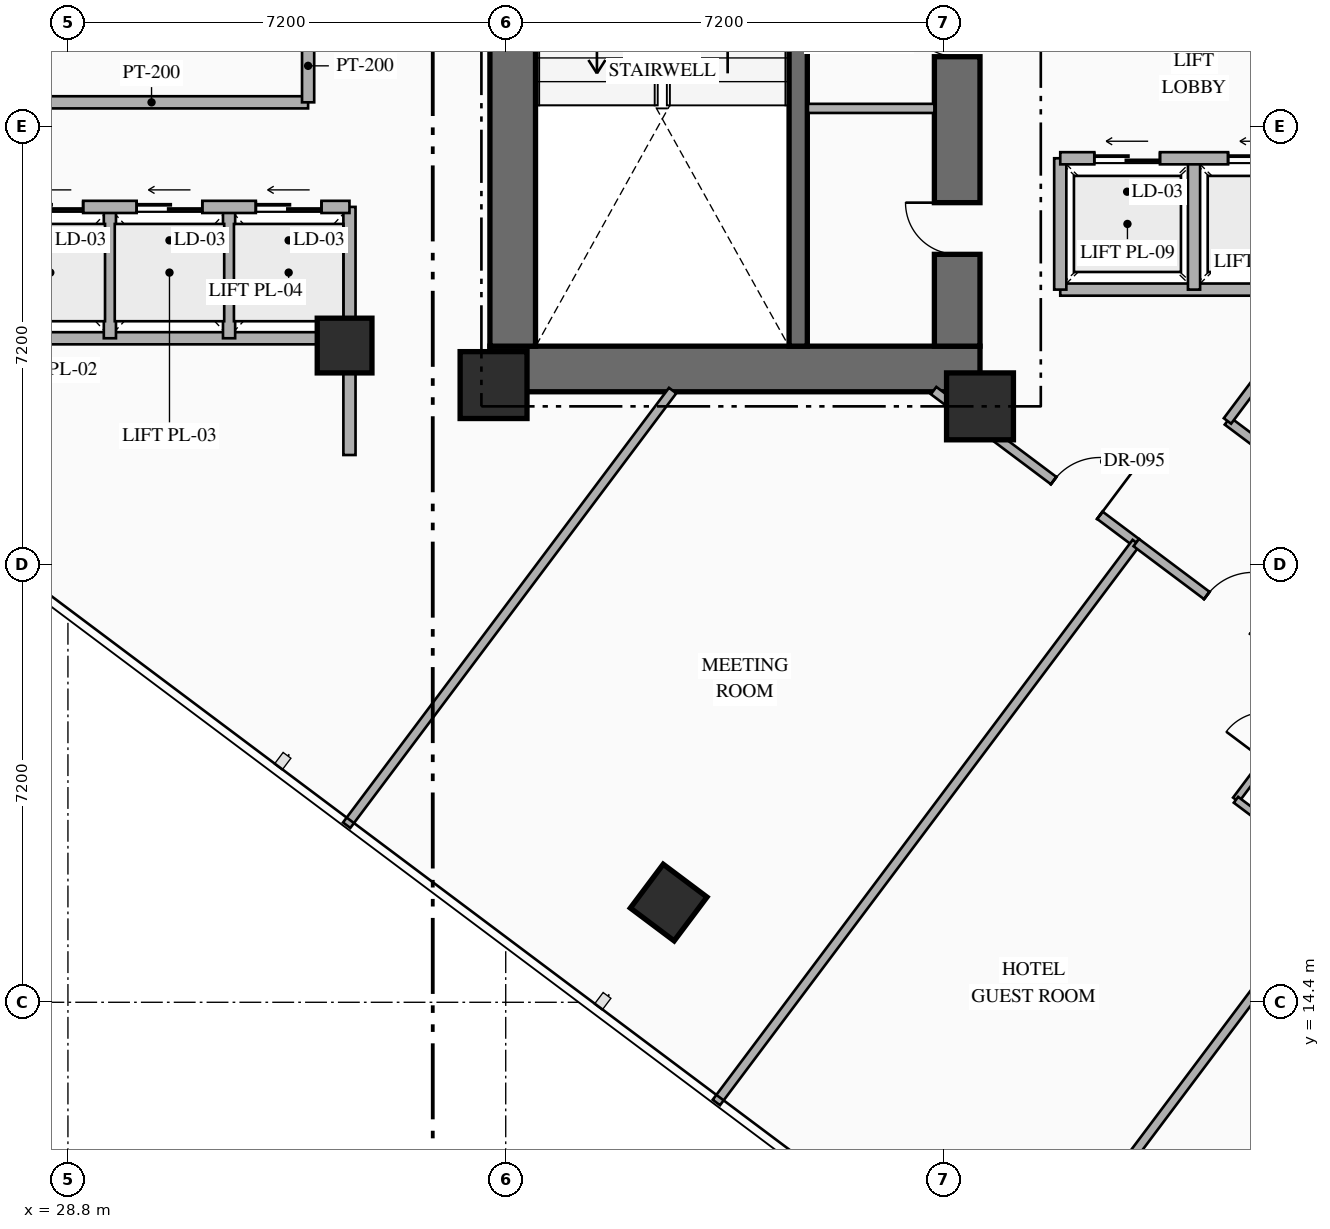
"""IFC4 building model, lengths in metres.
Left out: names, types, materials, properties, quantities, classifications, styles, units other than length and angle.
Written with IfcOpenShell. Run it as: python <this file> out.ifc"""

import sys

from ifc_helpers import new_model, si_unit, direction, frame, frame_2d, origin, origin_2d, place, context, subcontext, project, spatial, rectangle, hollow_rectangle, extrude, element, fill, save


model = new_model("IFC4")
c1 = context("Model", 3, precision=1e-05, world=origin(), true_north=direction((0.0, 1.0)))
c2 = subcontext(c1, "Body", "Model", "MODEL_VIEW")
j1 = project(units=[si_unit("LENGTHUNIT", "METRE"), si_unit("PLANEANGLEUNIT", "RADIAN")], contexts=[c1])
p1 = place(None, origin())
s1 = spatial("IfcSite", under=j1, at=p1, CompositionType="ELEMENT")
p2 = place(p1, origin())
s2 = spatial("IfcBuilding", under=s1, at=p2, CompositionType="ELEMENT")
p3 = place(p2, frame((0.0, 0.0, 84.65)))
s3 = spatial("IfcBuildingStorey", under=s2, at=p3, CompositionType="ELEMENT", Elevation=84.65)
p4 = place(p3, frame((35.74, 24.815, 0.0), z_axis=(0.0, 0.0, 1.0), x_axis=(1.0, 0.0, 0.0)))
e1 = element("IfcWall", 1, at=p4, inside=s3, PredefinedType="SHEAR", context=c2, shape_type="SweptSolid", body=[
    extrude(rectangle(XDim=8.06, YDim=0.75, at=frame_2d((4.03, 0.0))), origin(), (0.0, 0.0, 1.0), 3.35),
])
p5 = place(p3, frame((36.115, 25.19, 0.0), z_axis=(0.0, 0.0, 1.0), x_axis=(0.0, 1.0, 0.0)))
e2 = element("IfcWall", 2, at=p5, inside=s3, PredefinedType="SHEAR", context=c2, shape_type="SweptSolid", body=[
    extrude(rectangle(XDim=9.48, YDim=0.75, at=frame_2d((4.74, 0.0))), origin(), (0.0, 0.0, 1.0), 3.35),
])
p6 = place(p3, frame((43.425, 25.19, 0.0), z_axis=(0.0, 0.0, 1.0), x_axis=(0.0, 1.0, 0.0)))
e3 = element("IfcWall", 3, at=p6, inside=s3, PredefinedType="SHEAR", context=c2, shape_type="SweptSolid", body=[
    extrude(rectangle(XDim=9.48, YDim=0.75, at=frame_2d((4.74, 0.0))), origin(), (0.0, 0.0, 1.0), 3.35),
])
p7 = place(p6, frame((1.51, 0.0, 0.0)))
e4 = element("IfcOpeningElement", 4, at=p7, cuts=e3, PredefinedType="OPENING", context=c2, shape_type="SweptSolid", body=[
    extrude(rectangle(XDim=0.85, YDim=2.08, at=frame_2d((0.425, 1.04))), frame((0.0, 0.385, 0.0), z_axis=(0.0, -1.0, 0.0), x_axis=(1.0, 0.0, 0.0)), (0.0, 0.0, 1.0), 0.77),
])
p8 = place(p6, frame((4.76, 0.0, 0.0)))
e5 = element("IfcOpeningElement", 5, at=p8, cuts=e3, PredefinedType="OPENING", context=c2, shape_type="SweptSolid", body=[
    extrude(rectangle(XDim=0.85, YDim=2.08, at=frame_2d((0.425, 1.04))), frame((0.0, 0.385, 0.0), z_axis=(0.0, -1.0, 0.0), x_axis=(1.0, 0.0, 0.0)), (0.0, 0.0, 1.0), 0.77),
])
p9 = place(p3, frame((40.81, 25.19, 0.0), z_axis=(0.0, 0.0, 1.0), x_axis=(0.0, 1.0, 0.0)))
e6 = element("IfcWall", 6, at=p9, inside=s3, PredefinedType="SHEAR", context=c2, shape_type="SweptSolid", body=[
    extrude(rectangle(XDim=9.48, YDim=0.3, at=frame_2d((4.74, 0.0))), origin(), (0.0, 0.0, 1.0), 3.35),
])
for number, where, z_axis, x_axis in (
    (7, (35.8, 24.55, 0.0), (0.0, 0.0, 1.0), (1.0, 0.0, 0.0)),
    (8, (43.8, 24.2, 0.0), (0.0, 0.0, 1.0), (1.0, 0.0, 0.0)),
):
    element("IfcColumn", number, at=place(p3, frame(where, z_axis=z_axis, x_axis=x_axis)), inside=s3, PredefinedType="COLUMN", context=c2, shape_type="SweptSolid", body=[
        extrude(rectangle(XDim=1.1, YDim=1.1, at=origin_2d()), origin(), (0.0, 0.0, 1.0), 3.35),
    ])
for number, where, z_axis, x_axis in (
    (9, (33.35, 25.2, 0.0), (0.0, 0.0, 1.0), (1.0, 0.0, 0.0)),
    (10, (38.68, 16.04, 0.0), (0.0, 0.0, 1.0), (0.8, -0.6, 0.0)),
):
    element("IfcColumn", number, at=place(p3, frame(where, z_axis=z_axis, x_axis=x_axis)), inside=s3, PredefinedType="COLUMN", context=c2, shape_type="SweptSolid", body=[
        extrude(hollow_rectangle(XDim=0.9, YDim=0.9, WallThickness=0.036, at=origin_2d()), origin(), (0.0, 0.0, 1.0), 3.35),
    ])
p10 = place(p3, frame((44.86, 40.73, 0.0), z_axis=(0.0, 0.0, 1.0), x_axis=(0.800006902154, -0.599990797017, 0.0)))
e11 = element("IfcWall", 11, at=p10, inside=s3, PredefinedType="STANDARD", context=c2, shape_type="SweptSolid", body=[
    extrude(rectangle(XDim=29.712, YDim=0.28, at=frame_2d((14.856, 0.0))), origin(), (0.0, 0.0, 1.0), 3.13),
])
p11 = place(p10, frame((14.249, 0.0, 0.0)))
e12 = element("IfcOpeningElement", 12, at=p11, cuts=e11, PredefinedType="OPENING", context=c2, shape_type="SweptSolid", body=[
    extrude(rectangle(XDim=1.1, YDim=2.2, at=frame_2d((0.55, 1.1))), frame((0.0, 0.15, 0.0), z_axis=(0.0, -1.0, 0.0), x_axis=(1.0, 0.0, 0.0)), (0.0, 0.0, 1.0), 0.3),
])
p12 = place(p10, frame((1.612, 0.0, 0.85)))
e13 = element("IfcOpeningElement", 13, at=p12, cuts=e11, PredefinedType="OPENING", context=c2, shape_type="SweptSolid", body=[
    extrude(rectangle(XDim=1.4, YDim=1.8, at=frame_2d((0.7, 0.9))), frame((0.0, 0.15, 0.0), z_axis=(0.0, -1.0, 0.0), x_axis=(1.0, 0.0, 0.0)), (0.0, 0.0, 1.0), 0.3),
])
p13 = place(p10, frame((5.667, 0.0, 0.85)))
e14 = element("IfcOpeningElement", 14, at=p13, cuts=e11, PredefinedType="OPENING", context=c2, shape_type="SweptSolid", body=[
    extrude(rectangle(XDim=1.4, YDim=1.8, at=frame_2d((0.7, 0.9))), frame((0.0, 0.15, 0.0), z_axis=(0.0, -1.0, 0.0), x_axis=(1.0, 0.0, 0.0)), (0.0, 0.0, 1.0), 0.3),
])
p14 = place(p10, frame((9.912, 0.0, 0.85)))
e15 = element("IfcOpeningElement", 15, at=p14, cuts=e11, PredefinedType="OPENING", context=c2, shape_type="SweptSolid", body=[
    extrude(rectangle(XDim=1.4, YDim=1.8, at=frame_2d((0.7, 0.9))), frame((0.0, 0.15, 0.0), z_axis=(0.0, -1.0, 0.0), x_axis=(1.0, 0.0, 0.0)), (0.0, 0.0, 1.0), 0.3),
])
p15 = place(p10, frame((19.743, 0.0, 0.85)))
e16 = element("IfcOpeningElement", 16, at=p15, cuts=e11, PredefinedType="OPENING", context=c2, shape_type="SweptSolid", body=[
    extrude(rectangle(XDim=1.4, YDim=1.8, at=frame_2d((0.7, 0.9))), frame((0.0, 0.15, 0.0), z_axis=(0.0, -1.0, 0.0), x_axis=(1.0, 0.0, 0.0)), (0.0, 0.0, 1.0), 0.3),
])
p16 = place(p10, frame((22.645, 0.0, 0.85)))
e17 = element("IfcOpeningElement", 17, at=p16, cuts=e11, PredefinedType="OPENING", context=c2, shape_type="SweptSolid", body=[
    extrude(rectangle(XDim=1.4, YDim=1.8, at=frame_2d((0.7, 0.9))), frame((0.0, 0.15, 0.0), z_axis=(0.0, -1.0, 0.0), x_axis=(1.0, 0.0, 0.0)), (0.0, 0.0, 1.0), 0.3),
])
p17 = place(p10, frame((26.7, 0.0, 0.85)))
e18 = element("IfcOpeningElement", 18, at=p17, cuts=e11, PredefinedType="OPENING", context=c2, shape_type="SweptSolid", body=[
    extrude(rectangle(XDim=1.4, YDim=1.8, at=frame_2d((0.7, 0.9))), frame((0.0, 0.15, 0.0), z_axis=(0.0, -1.0, 0.0), x_axis=(1.0, 0.0, 0.0)), (0.0, 0.0, 1.0), 0.3),
])
p18 = place(p3, frame((40.97, 29.1, 0.0), z_axis=(0.0, 0.0, 1.0), x_axis=(1.0, 0.0, 0.0)))
e19 = element("IfcWall", 19, at=p18, inside=s3, PredefinedType="PARTITIONING", context=c2, shape_type="SweptSolid", body=[
    extrude(rectangle(XDim=2.08, YDim=0.15, at=frame_2d((1.04, 0.0))), origin(), (0.0, 0.0, 1.0), 3.13),
])
p19 = place(p3, frame((27.6, 29.2, 0.0), z_axis=(0.0, 0.0, 1.0), x_axis=(1.0, 0.0, 0.0)))
e20 = element("IfcWall", 20, at=p19, inside=s3, PredefinedType="STANDARD", context=c2, shape_type="SweptSolid", body=[
    extrude(rectangle(XDim=5.15, YDim=0.2, at=frame_2d((2.575, 0.0))), origin(), (0.0, 0.0, 1.0), 3.13),
])
p20 = place(p3, frame((32.75, 29.2, 0.0), z_axis=(0.0, 0.0, 1.0), x_axis=(0.0, 1.0, 0.0)))
e21 = element("IfcWall", 21, at=p20, inside=s3, PredefinedType="STANDARD", context=c2, shape_type="SweptSolid", body=[
    extrude(rectangle(XDim=3.24, YDim=0.2, at=frame_2d((1.62, 0.0))), origin(), (0.0, 0.0, 1.0), 3.13),
])
p21 = place(p20, frame((1.45, 0.0, 0.0)))
e22 = element("IfcOpeningElement", 22, at=p21, cuts=e21, PredefinedType="OPENING", context=c2, shape_type="SweptSolid", body=[
    extrude(rectangle(XDim=1.0, YDim=2.2, at=frame_2d((0.5, 1.1))), frame((0.0, 0.11, 0.0), z_axis=(0.0, -1.0, 0.0), x_axis=(1.0, 0.0, 0.0)), (0.0, 0.0, 1.0), 0.22),
])
p22 = place(p3, frame((33.43, 23.4, 0.0), z_axis=(0.0, 0.0, 1.0), x_axis=(0.0, 1.0, 0.0)))
e23 = element("IfcWall", 23, at=p22, inside=s3, PredefinedType="STANDARD", context=c2, shape_type="SweptSolid", body=[
    extrude(rectangle(XDim=4.08, YDim=0.2, at=frame_2d((2.04, 0.0))), origin(), (0.0, 0.0, 1.0), 2.425),
])
p23 = place(p3, frame((25.55, 25.32, 0.0), z_axis=(0.0, 0.0, 1.0), x_axis=(1.0, 0.0, 0.0)))
e24 = element("IfcWall", 24, at=p23, inside=s3, PredefinedType="STANDARD", context=c2, shape_type="SweptSolid", body=[
    extrude(rectangle(XDim=7.88, YDim=0.2, at=frame_2d((3.94, 0.0))), origin(), (0.0, 0.0, 1.0), 2.525),
])
for number, where, z_axis, x_axis in (
    (25, (29.49, 25.32, 0.0), (0.0, 0.0, 1.0), (0.0, 1.0, 0.0)),
    (26, (31.45, 25.32, 0.0), (0.0, 0.0, 1.0), (0.0, 1.0, 0.0)),
):
    element("IfcWall", number, at=place(p3, frame(where, z_axis=z_axis, x_axis=x_axis)), inside=s3, PredefinedType="STANDARD", context=c2, shape_type="SweptSolid", body=[
        extrude(rectangle(XDim=2.16, YDim=0.2, at=frame_2d((1.08, 0.0))), origin(), (0.0, 0.0, 1.0), 3.13),
    ])
p24 = place(p3, frame((25.55, 27.48, 0.0), z_axis=(0.0, 0.0, 1.0), x_axis=(1.0, 0.0, 0.0)))
e27 = element("IfcWall", 27, at=p24, inside=s3, PredefinedType="STANDARD", context=c2, shape_type="SweptSolid", body=[
    extrude(rectangle(XDim=7.88, YDim=0.2, at=frame_2d((3.94, 0.0))), origin(), (0.0, 0.0, 1.0), 3.13),
])
p25 = place(p24, frame((0.46, 0.0, 0.0)))
e28 = element("IfcOpeningElement", 28, at=p25, cuts=e27, PredefinedType="OPENING", context=c2, shape_type="SweptSolid", body=[
    extrude(rectangle(XDim=1.08, YDim=2.15, at=frame_2d((0.54, 1.075))), frame((0.0, 0.11, 0.0), z_axis=(0.0, -1.0, 0.0), x_axis=(1.0, 0.0, 0.0)), (0.0, 0.0, 1.0), 0.22),
])
p26 = place(p24, frame((2.42, 0.0, 0.0)))
e29 = element("IfcOpeningElement", 29, at=p26, cuts=e27, PredefinedType="OPENING", context=c2, shape_type="SweptSolid", body=[
    extrude(rectangle(XDim=1.08, YDim=2.15, at=frame_2d((0.54, 1.075))), frame((0.0, 0.11, 0.0), z_axis=(0.0, -1.0, 0.0), x_axis=(1.0, 0.0, 0.0)), (0.0, 0.0, 1.0), 0.22),
])
p27 = place(p24, frame((4.38, 0.0, 0.0)))
e30 = element("IfcOpeningElement", 30, at=p27, cuts=e27, PredefinedType="OPENING", context=c2, shape_type="SweptSolid", body=[
    extrude(rectangle(XDim=1.08, YDim=2.15, at=frame_2d((0.54, 1.075))), frame((0.0, 0.11, 0.0), z_axis=(0.0, -1.0, 0.0), x_axis=(1.0, 0.0, 0.0)), (0.0, 0.0, 1.0), 0.22),
])
p28 = place(p24, frame((6.34, 0.0, 0.0)))
e31 = element("IfcOpeningElement", 31, at=p28, cuts=e27, PredefinedType="OPENING", context=c2, shape_type="SweptSolid", body=[
    extrude(rectangle(XDim=1.08, YDim=2.15, at=frame_2d((0.54, 1.075))), frame((0.0, 0.11, 0.0), z_axis=(0.0, -1.0, 0.0), x_axis=(1.0, 0.0, 0.0)), (0.0, 0.0, 1.0), 0.22),
])
p29 = place(p3, frame((45.12, 26.12, 0.0), z_axis=(0.0, 0.0, 1.0), x_axis=(1.0, 0.0, 0.0)))
e32 = element("IfcWall", 32, at=p29, inside=s3, PredefinedType="STANDARD", context=c2, shape_type="SweptSolid", body=[
    extrude(rectangle(XDim=4.4, YDim=0.2, at=frame_2d((2.2, 0.0))), origin(), (0.0, 0.0, 1.0), 3.13),
])
for number, where, z_axis, x_axis in (
    (33, (45.12, 26.12, 0.0), (0.0, 0.0, 1.0), (0.0, 1.0, 0.0)),
    (34, (47.32, 26.12, 0.0), (0.0, 0.0, 1.0), (0.0, 1.0, 0.0)),
):
    element("IfcWall", number, at=place(p3, frame(where, z_axis=z_axis, x_axis=x_axis)), inside=s3, PredefinedType="STANDARD", context=c2, shape_type="SweptSolid", body=[
        extrude(rectangle(XDim=2.16, YDim=0.2, at=frame_2d((1.08, 0.0))), origin(), (0.0, 0.0, 1.0), 3.13),
    ])
p30 = place(p3, frame((45.12, 28.28, 0.0), z_axis=(0.0, 0.0, 1.0), x_axis=(1.0, 0.0, 0.0)))
e35 = element("IfcWall", 35, at=p30, inside=s3, PredefinedType="STANDARD", context=c2, shape_type="SweptSolid", body=[
    extrude(rectangle(XDim=4.4, YDim=0.2, at=frame_2d((2.2, 0.0))), origin(), (0.0, 0.0, 1.0), 3.13),
])
p31 = place(p30, frame((0.56, 0.0, 0.0)))
e36 = element("IfcOpeningElement", 36, at=p31, cuts=e35, PredefinedType="OPENING", context=c2, shape_type="SweptSolid", body=[
    extrude(rectangle(XDim=1.08, YDim=2.15, at=frame_2d((0.54, 1.075))), frame((0.0, 0.11, 0.0), z_axis=(0.0, -1.0, 0.0), x_axis=(1.0, 0.0, 0.0)), (0.0, 0.0, 1.0), 0.22),
])
p32 = place(p30, frame((2.76, 0.0, 0.0)))
e37 = element("IfcOpeningElement", 37, at=p32, cuts=e35, PredefinedType="OPENING", context=c2, shape_type="SweptSolid", body=[
    extrude(rectangle(XDim=1.08, YDim=2.15, at=frame_2d((0.54, 1.075))), frame((0.0, 0.11, 0.0), z_axis=(0.0, -1.0, 0.0), x_axis=(1.0, 0.0, 0.0)), (0.0, 0.0, 1.0), 0.22),
])
p33 = place(p3, frame((43.037, 24.46, 0.0), z_axis=(0.0, 0.0, 1.0), x_axis=(0.799971872363, -0.600037501685, 0.0)))
e38 = element("IfcWall", 38, at=p33, inside=s3, PredefinedType="PARTITIONING", context=c2, shape_type="SweptSolid", body=[
    extrude(rectangle(XDim=4.167, YDim=0.15, at=frame_2d((2.083, 0.0))), origin(), (0.0, 0.0, 1.0), 2.425),
])
p34 = place(p33, frame((2.468, 0.0, 0.0)))
e39 = element("IfcOpeningElement", 39, at=p34, cuts=e38, PredefinedType="OPENING", context=c2, shape_type="SweptSolid", body=[
    extrude(rectangle(XDim=0.95, YDim=2.15, at=frame_2d((0.475, 1.075))), frame((0.0, 0.085, 0.0), z_axis=(0.0, -1.0, 0.0), x_axis=(1.0, 0.0, 0.0)), (0.0, 0.0, 1.0), 0.17),
])
p35 = place(p3, frame((33.384, 17.312, 0.0), z_axis=(0.0, 0.0, 1.0), x_axis=(0.600008743659, 0.799993442181, 0.0)))
e40 = element("IfcWall", 40, at=p35, inside=s3, PredefinedType="PARTITIONING", context=c2, shape_type="SweptSolid", body=[
    extrude(rectangle(XDim=8.935, YDim=0.15, at=frame_2d((4.468, 0.0))), origin(), (0.0, 0.0, 1.0), 3.13),
])
p36 = place(p3, frame((39.464, 12.752, 0.0), z_axis=(0.0, 0.0, 1.0), x_axis=(0.6, 0.8, 0.0)))
e41 = element("IfcWall", 41, at=p36, inside=s3, PredefinedType="PARTITIONING", context=c2, shape_type="SweptSolid", body=[
    extrude(rectangle(XDim=11.51, YDim=0.15, at=frame_2d((5.755, 0.0))), origin(), (0.0, 0.0, 1.0), 3.13),
])
p37 = place(p3, frame((47.87, 23.96, 0.0), z_axis=(0.0, 0.0, 1.0), x_axis=(0.79998637334, -0.60001816845, 0.0)))
e42 = element("IfcWall", 42, at=p37, inside=s3, PredefinedType="PARTITIONING", context=c2, shape_type="SweptSolid", body=[
    extrude(rectangle(XDim=2.15, YDim=0.15, at=frame_2d((1.075, 0.0))), origin(), (0.0, 0.0, 1.0), 2.775),
])
p38 = place(p3, frame((47.87, 23.96, 0.0), z_axis=(0.0, 0.0, 1.0), x_axis=(0.599996617946, 0.80000253653, 0.0)))
e43 = element("IfcWall", 43, at=p38, inside=s3, PredefinedType="PARTITIONING", context=c2, shape_type="SweptSolid", body=[
    extrude(rectangle(XDim=11.55, YDim=0.15, at=frame_2d((5.775, 0.0))), origin(), (0.0, 0.0, 1.0), 3.13),
])
p39 = place(p3, frame((46.37, 21.96, 0.0), z_axis=(0.0, 0.0, 1.0), x_axis=(0.799977170108, -0.600030438649, 0.0)))
e44 = element("IfcWall", 44, at=p39, inside=s3, PredefinedType="PARTITIONING", context=c2, shape_type="SweptSolid", body=[
    extrude(rectangle(XDim=3.85, YDim=0.15, at=frame_2d((1.925, 0.0))), origin(), (0.0, 0.0, 1.0), 2.425),
])
p40 = place(p39, frame((1.45, 0.0, 0.0)))
e45 = element("IfcOpeningElement", 45, at=p40, cuts=e44, PredefinedType="OPENING", context=c2, shape_type="SweptSolid", body=[
    extrude(rectangle(XDim=0.95, YDim=2.15, at=frame_2d((0.475, 1.075))), frame((0.0, 0.085, 0.0), z_axis=(0.0, -1.0, 0.0), x_axis=(1.0, 0.0, 0.0)), (0.0, 0.0, 1.0), 0.17),
])
p41 = place(p3, frame((48.01, 17.73, 0.0), z_axis=(0.0, 0.0, 1.0), x_axis=(0.6, 0.8, 0.0)))
e46 = element("IfcWall", 46, at=p41, inside=s3, PredefinedType="PARTITIONING", context=c2, shape_type="SweptSolid", body=[
    extrude(rectangle(XDim=2.4, YDim=0.12, at=frame_2d((1.2, 0.0))), origin(), (0.0, 0.0, 1.0), 3.13),
])
p42 = place(p41, frame((0.8, 0.0, 0.0)))
e47 = element("IfcOpeningElement", 47, at=p42, cuts=e46, PredefinedType="OPENING", context=c2, shape_type="SweptSolid", body=[
    extrude(rectangle(XDim=0.8, YDim=2.06, at=frame_2d((0.4, 1.03))), frame((0.0, 0.07, 0.0), z_axis=(0.0, -1.0, 0.0), x_axis=(1.0, 0.0, 0.0)), (0.0, 0.0, 1.0), 0.14),
])
p43 = place(p3, frame((48.01, 17.73, 0.0), z_axis=(0.0, 0.0, 1.0), x_axis=(0.79998637334, -0.60001816845, 0.0)))
e48 = element("IfcWall", 48, at=p43, inside=s3, PredefinedType="PARTITIONING", context=c2, shape_type="SweptSolid", body=[
    extrude(rectangle(XDim=2.15, YDim=0.12, at=frame_2d((1.075, 0.0))), origin(), (0.0, 0.0, 1.0), 3.13),
])
p44 = place(p3, frame((44.36, 9.28, 0.0), z_axis=(0.0, 0.0, 1.0), x_axis=(0.599986233332, 0.800010324816, 0.0)))
e49 = element("IfcWall", 49, at=p44, inside=s3, PredefinedType="PARTITIONING", context=c2, shape_type="SweptSolid", body=[
    extrude(rectangle(XDim=11.35, YDim=0.15, at=frame_2d((5.675, 0.0))), origin(), (0.0, 0.0, 1.0), 2.425),
])
p45 = place(p7, origin())
e50 = element("IfcDoor", 50, at=p45, inside=s3, OperationType="SINGLE_SWING_RIGHT", PredefinedType="DOOR", context=c2, shape_type="SweptSolid", body=[
    extrude(rectangle(XDim=0.85, YDim=2.08, at=frame_2d((0.425, 1.04))), frame((0.0, 0.025, 0.0), z_axis=(0.0, -1.0, 0.0), x_axis=(1.0, 0.0, 0.0)), (0.0, 0.0, 1.0), 0.05),
])
fill(e4, e50)
p46 = place(p8, origin())
e51 = element("IfcDoor", 51, at=p46, inside=s3, OperationType="SINGLE_SWING_RIGHT", PredefinedType="DOOR", context=c2, shape_type="SweptSolid", body=[
    extrude(rectangle(XDim=0.85, YDim=2.08, at=frame_2d((0.425, 1.04))), frame((0.0, 0.025, 0.0), z_axis=(0.0, -1.0, 0.0), x_axis=(1.0, 0.0, 0.0)), (0.0, 0.0, 1.0), 0.05),
])
fill(e5, e51)
p47 = place(p26, origin())
e52 = element("IfcDoor", 52, at=p47, inside=s3, OperationType="SLIDING_TO_LEFT", PredefinedType="USERDEFINED", context=c2, shape_type="SweptSolid", body=[
    extrude(rectangle(XDim=1.08, YDim=2.15, at=frame_2d((0.54, 1.075))), frame((0.0, 0.025, 0.0), z_axis=(0.0, -1.0, 0.0), x_axis=(1.0, 0.0, 0.0)), (0.0, 0.0, 1.0), 0.05),
])
fill(e29, e52)
p48 = place(p27, origin())
e53 = element("IfcDoor", 53, at=p48, inside=s3, OperationType="SLIDING_TO_LEFT", PredefinedType="USERDEFINED", context=c2, shape_type="SweptSolid", body=[
    extrude(rectangle(XDim=1.08, YDim=2.15, at=frame_2d((0.54, 1.075))), frame((0.0, 0.025, 0.0), z_axis=(0.0, -1.0, 0.0), x_axis=(1.0, 0.0, 0.0)), (0.0, 0.0, 1.0), 0.05),
])
fill(e30, e53)
p49 = place(p28, origin())
e54 = element("IfcDoor", 54, at=p49, inside=s3, OperationType="SLIDING_TO_LEFT", PredefinedType="USERDEFINED", context=c2, shape_type="SweptSolid", body=[
    extrude(rectangle(XDim=1.08, YDim=2.15, at=frame_2d((0.54, 1.075))), frame((0.0, 0.025, 0.0), z_axis=(0.0, -1.0, 0.0), x_axis=(1.0, 0.0, 0.0)), (0.0, 0.0, 1.0), 0.05),
])
fill(e31, e54)
p50 = place(p31, origin())
e55 = element("IfcDoor", 55, at=p50, inside=s3, OperationType="SLIDING_TO_LEFT", PredefinedType="USERDEFINED", context=c2, shape_type="SweptSolid", body=[
    extrude(rectangle(XDim=1.08, YDim=2.15, at=frame_2d((0.54, 1.075))), frame((0.0, 0.025, 0.0), z_axis=(0.0, -1.0, 0.0), x_axis=(1.0, 0.0, 0.0)), (0.0, 0.0, 1.0), 0.05),
])
fill(e36, e55)
p51 = place(p32, origin())
e56 = element("IfcDoor", 56, at=p51, inside=s3, OperationType="SLIDING_TO_LEFT", PredefinedType="USERDEFINED", context=c2, shape_type="SweptSolid", body=[
    extrude(rectangle(XDim=1.08, YDim=2.15, at=frame_2d((0.54, 1.075))), frame((0.0, 0.025, 0.0), z_axis=(0.0, -1.0, 0.0), x_axis=(1.0, 0.0, 0.0)), (0.0, 0.0, 1.0), 0.05),
])
fill(e37, e56)
p52 = place(p34, origin())
e57 = element("IfcDoor", 57, at=p52, inside=s3, OperationType="SINGLE_SWING_RIGHT", PredefinedType="DOOR", context=c2, shape_type="SweptSolid", body=[
    extrude(rectangle(XDim=0.95, YDim=2.15, at=frame_2d((0.475, 1.075))), frame((0.0, 0.025, 0.0), z_axis=(0.0, -1.0, 0.0), x_axis=(1.0, 0.0, 0.0)), (0.0, 0.0, 1.0), 0.05),
])
fill(e39, e57)
p53 = place(p40, origin())
e58 = element("IfcDoor", 58, at=p53, inside=s3, OperationType="SINGLE_SWING_RIGHT", PredefinedType="DOOR", context=c2, shape_type="SweptSolid", body=[
    extrude(rectangle(XDim=0.95, YDim=2.15, at=frame_2d((0.475, 1.075))), frame((0.0, 0.025, 0.0), z_axis=(0.0, -1.0, 0.0), x_axis=(1.0, 0.0, 0.0)), (0.0, 0.0, 1.0), 0.05),
])
fill(e45, e58)
save(model, sys.argv[1])
